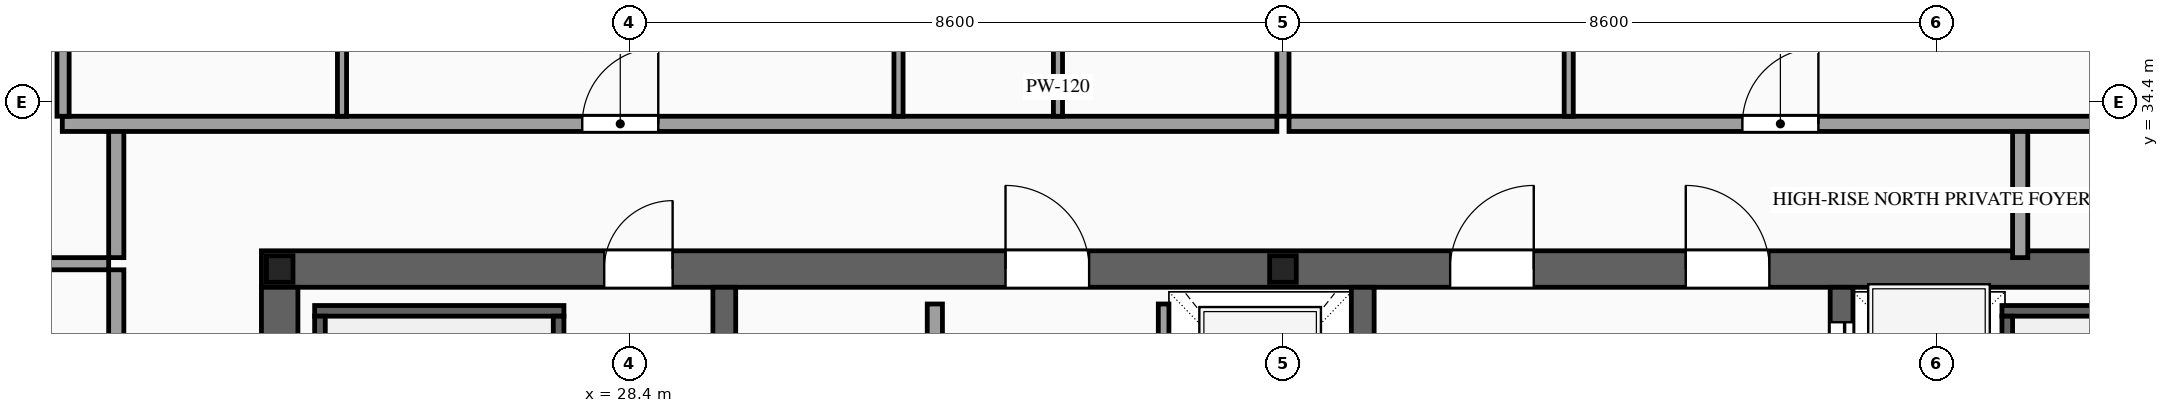
"""IFC4 building model, lengths in metres.
Left out: names, types, materials, properties, quantities, classifications, styles, units other than length and angle.
Written with IfcOpenShell. Run it as: python <this file> out.ifc"""

import sys

from ifc_helpers import new_model, si_unit, direction, frame, frame_2d, origin, origin_2d, place, context, subcontext, project, spatial, rectangle, i_section, extrude, source, transform, mapped, element, fill, save


model = new_model("IFC4")
c1 = context("Model", 3, precision=1e-05, world=origin(), true_north=direction((0.0, 1.0)))
c2 = subcontext(c1, "Body", "Model", "MODEL_VIEW")
j1 = project(units=[si_unit("LENGTHUNIT", "METRE"), si_unit("PLANEANGLEUNIT", "RADIAN")], contexts=[c1])
p1 = place(None, origin())
s1 = spatial("IfcSite", under=j1, at=p1, CompositionType="ELEMENT")
p2 = place(p1, origin())
s2 = spatial("IfcBuilding", under=s1, at=p2, CompositionType="ELEMENT")
p3 = place(p2, frame((0.0, 0.0, 314.7)))
s3 = spatial("IfcBuildingStorey", under=s2, at=p3, CompositionType="ELEMENT", Elevation=314.7)
p4 = place(p3, frame((23.56, 32.2, 0.0), z_axis=(0.0, 0.0, 1.0), x_axis=(1.0, 0.0, 0.0)))
e1 = element("IfcWall", 1, at=p4, inside=s3, PredefinedType="SHEAR", context=c2, shape_type="SweptSolid", body=[
    extrude(rectangle(XDim=26.88, YDim=0.48, at=frame_2d((13.44, 0.0))), origin(), (0.0, 0.0, 1.0), 3.5),
])
p5 = place(p4, frame((4.51, 0.0, 0.0)))
e2 = element("IfcOpeningElement", 2, at=p5, cuts=e1, PredefinedType="OPENING", context=c2, shape_type="SweptSolid", body=[
    extrude(rectangle(XDim=0.9, YDim=2.15, at=frame_2d((0.45, 1.075))), frame((0.0, 0.255, 0.0), z_axis=(0.0, -1.0, 0.0), x_axis=(1.0, 0.0, 0.0)), (0.0, 0.0, 1.0), 0.51),
])
p6 = place(p4, frame((9.79, 0.0, 0.0)))
e3 = element("IfcOpeningElement", 3, at=p6, cuts=e1, PredefinedType="OPENING", context=c2, shape_type="SweptSolid", body=[
    extrude(rectangle(XDim=1.1, YDim=2.2, at=frame_2d((0.55, 1.1))), frame((0.0, 0.255, 0.0), z_axis=(0.0, -1.0, 0.0), x_axis=(1.0, 0.0, 0.0)), (0.0, 0.0, 1.0), 0.51),
])
p7 = place(p4, frame((15.64, 0.0, 0.0)))
e4 = element("IfcOpeningElement", 4, at=p7, cuts=e1, PredefinedType="OPENING", context=c2, shape_type="SweptSolid", body=[
    extrude(rectangle(XDim=1.1, YDim=2.2, at=frame_2d((0.55, 1.1))), frame((0.0, 0.255, 0.0), z_axis=(0.0, -1.0, 0.0), x_axis=(1.0, 0.0, 0.0)), (0.0, 0.0, 1.0), 0.51),
])
p8 = place(p4, frame((18.74, 0.0, 0.0)))
e5 = element("IfcOpeningElement", 5, at=p8, cuts=e1, PredefinedType="OPENING", context=c2, shape_type="SweptSolid", body=[
    extrude(rectangle(XDim=1.1, YDim=2.2, at=frame_2d((0.55, 1.1))), frame((0.0, 0.255, 0.0), z_axis=(0.0, -1.0, 0.0), x_axis=(1.0, 0.0, 0.0)), (0.0, 0.0, 1.0), 0.51),
])
m1 = source(origin(), c2, "Body", "SweptSolid", [
    extrude(rectangle(XDim=12.32, YDim=0.48, at=frame_2d((6.16, 0.0))), origin(), (0.0, 0.0, 1.0), 3.5),
])
p9 = place(p3, frame((23.8, 19.64, 0.0), z_axis=(0.0, 0.0, 1.0), x_axis=(0.0, 1.0, 0.0)))
e6 = element("IfcWall", 6, at=p9, inside=s3, PredefinedType="SHEAR", context=c2, shape_type="MappedRepresentation", body=[
    mapped(m1, transform((0.0, 0.0, 0.0), scale=1.0)),
])
m2 = source(origin(), c2, "Body", "SweptSolid", [
    extrude(rectangle(XDim=12.32, YDim=0.3, at=frame_2d((6.16, 0.0))), origin(), (0.0, 0.0, 1.0), 3.5),
])
for number, where, z_axis, x_axis in (
    (7, (29.65, 19.64, 0.0), (0.0, 0.0, 1.0), (0.0, 1.0, 0.0)),
    (8, (38.05, 19.64, 0.0), (0.0, 0.0, 1.0), (0.0, 1.0, 0.0)),
):
    element("IfcWall", number, at=place(p3, frame(where, z_axis=z_axis, x_axis=x_axis)), inside=s3, PredefinedType="SOLIDWALL", context=c2, shape_type="MappedRepresentation", body=[
        mapped(m2, transform((0.0, 0.0, 0.0), scale=1.0)),
    ])
p10 = place(p3, frame((44.35, 19.64, 0.0), z_axis=(0.0, 0.0, 1.0), x_axis=(0.0, 1.0, 0.0)))
e9 = element("IfcWall", 9, at=p10, inside=s3, PredefinedType="SOLIDWALL", context=c2, shape_type="SweptSolid", body=[
    extrude(rectangle(XDim=12.32, YDim=0.3, at=frame_2d((6.16, 0.0))), origin(), (0.0, 0.0, 1.0), 3.5),
])
p11 = place(p10, frame((6.56, 0.0, 0.0)))
e10 = element("IfcOpeningElement", 10, at=p11, cuts=e9, PredefinedType="OPENING", context=c2, shape_type="SweptSolid", body=[
    extrude(rectangle(XDim=1.1, YDim=2.2, at=frame_2d((0.55, 1.1))), frame((0.0, 0.165, 0.0), z_axis=(0.0, -1.0, 0.0), x_axis=(1.0, 0.0, 0.0)), (0.0, 0.0, 1.0), 0.33),
])
p12 = place(p10, frame((8.66, 0.0, 0.0)))
e11 = element("IfcOpeningElement", 11, at=p12, cuts=e9, PredefinedType="OPENING", context=c2, shape_type="SweptSolid", body=[
    extrude(rectangle(XDim=1.1, YDim=2.2, at=frame_2d((0.55, 1.1))), frame((0.0, 0.165, 0.0), z_axis=(0.0, -1.0, 0.0), x_axis=(1.0, 0.0, 0.0)), (0.0, 0.0, 1.0), 0.33),
])
p13 = place(p10, frame((10.76, 0.0, 0.0)))
e12 = element("IfcOpeningElement", 12, at=p13, cuts=e9, PredefinedType="OPENING", context=c2, shape_type="SweptSolid", body=[
    extrude(rectangle(XDim=1.1, YDim=2.2, at=frame_2d((0.55, 1.1))), frame((0.0, 0.165, 0.0), z_axis=(0.0, -1.0, 0.0), x_axis=(1.0, 0.0, 0.0)), (0.0, 0.0, 1.0), 0.33),
])
m3 = source(origin(), c2, "Body", "SweptSolid", [
    extrude(i_section(OverallWidth=0.35, OverallDepth=0.35, WebThickness=0.012, FlangeThickness=0.019, at=origin_2d()), origin(), (0.0, 0.0, 1.0), 3.5),
])
for number, where, z_axis, x_axis in (
    (13, (23.8, 32.2, 0.0), (0.0, 0.0, 1.0), (1.0, 0.0, 0.0)),
    (14, (37.0, 32.2, 0.0), (0.0, 0.0, 1.0), (1.0, 0.0, 0.0)),
):
    element("IfcColumn", number, at=place(p3, frame(where, z_axis=z_axis, x_axis=x_axis)), inside=s3, PredefinedType="COLUMN", context=c2, shape_type="MappedRepresentation", body=[
        mapped(m3, transform((0.0, 0.0, 0.0), scale=1.0)),
    ])
p14 = place(p3, frame((35.43, 29.4, 0.0), z_axis=(0.0, 0.0, 1.0), x_axis=(0.0, 1.0, 0.0)))
e15 = element("IfcWall", 15, at=p14, inside=s3, PredefinedType="SOLIDWALL", context=c2, shape_type="SweptSolid", body=[
    extrude(rectangle(XDim=2.34, YDim=0.14, at=frame_2d((1.17, 0.0))), origin(), (0.0, 0.0, 1.0), 3.28),
])
p15 = place(p14, frame((0.62, 0.0, 0.0)))
e16 = element("IfcOpeningElement", 16, at=p15, cuts=e15, PredefinedType="OPENING", context=c2, shape_type="SweptSolid", body=[
    extrude(rectangle(XDim=1.1, YDim=2.2, at=frame_2d((0.55, 1.1))), frame((0.0, 0.085, 0.0), z_axis=(0.0, -1.0, 0.0), x_axis=(1.0, 0.0, 0.0)), (0.0, 0.0, 1.0), 0.17),
])
m4 = source(origin(), c2, "Body", "SweptSolid", [
    extrude(rectangle(XDim=3.28, YDim=0.14, at=frame_2d((1.64, 0.0))), origin(), (0.0, 0.0, 1.0), 3.28),
])
p16 = place(p3, frame((24.26, 31.65, 0.0), z_axis=(0.0, 0.0, 1.0), x_axis=(1.0, 0.0, 0.0)))
e17 = element("IfcWall", 17, at=p16, inside=s3, PredefinedType="SOLIDWALL", context=c2, shape_type="MappedRepresentation", body=[
    mapped(m4, transform((0.0, 0.0, 0.0), scale=1.0)),
])
m5 = source(origin(), c2, "Body", "SweptSolid", [
    extrude(rectangle(XDim=8.94, YDim=0.14, at=frame_2d((4.47, 0.0))), origin(), (0.0, 0.0, 1.0), 3.28),
])
for number, where, z_axis, x_axis in (
    (18, (24.33, 22.64, 0.0), (0.0, 0.0, 1.0), (0.0, 1.0, 0.0)),
    (19, (27.47, 22.64, 0.0), (0.0, 0.0, 1.0), (0.0, 1.0, 0.0)),
):
    element("IfcWall", number, at=place(p3, frame(where, z_axis=z_axis, x_axis=x_axis)), inside=s3, PredefinedType="SOLIDWALL", context=c2, shape_type="MappedRepresentation", body=[
        mapped(m5, transform((0.0, 0.0, 0.0), scale=1.0)),
    ])
p17 = place(p3, frame((46.46, 31.65, 0.0), z_axis=(0.0, 0.0, 1.0), x_axis=(1.0, 0.0, 0.0)))
e20 = element("IfcWall", 20, at=p17, inside=s3, PredefinedType="SOLIDWALL", context=c2, shape_type="MappedRepresentation", body=[
    mapped(m4, transform((0.0, 0.0, 0.0), scale=1.0)),
])
p18 = place(p3, frame((46.53, 22.64, 0.0), z_axis=(0.0, 0.0, 1.0), x_axis=(0.0, 1.0, 0.0)))
e21 = element("IfcWall", 21, at=p18, inside=s3, PredefinedType="SOLIDWALL", context=c2, shape_type="MappedRepresentation", body=[
    mapped(m5, transform((0.0, 0.0, 0.0), scale=1.0)),
])
p19 = place(p3, frame((32.42, 28.05, 0.0), z_axis=(0.0, 0.0, 1.0), x_axis=(0.0, 1.0, 0.0)))
e22 = element("IfcWall", 22, at=p19, inside=s3, PredefinedType="PARTITIONING", context=c2, shape_type="SweptSolid", body=[
    extrude(rectangle(XDim=3.69, YDim=0.2, at=frame_2d((1.845, 0.0))), origin(), (0.0, 0.0, 1.0), 3.28),
])
p20 = place(p19, frame((1.395, 0.0, 0.0)))
e23 = element("IfcOpeningElement", 23, at=p20, cuts=e22, PredefinedType="OPENING", context=c2, shape_type="SweptSolid", body=[
    extrude(rectangle(XDim=0.9, YDim=2.15, at=frame_2d((0.45, 1.075))), frame((0.0, 0.115, 0.0), z_axis=(0.0, -1.0, 0.0), x_axis=(1.0, 0.0, 0.0)), (0.0, 0.0, 1.0), 0.23),
])
m6 = source(origin(), c2, "Body", "SweptSolid", [
    extrude(rectangle(XDim=1.7, YDim=0.2, at=frame_2d((0.85, 0.0))), origin(), (0.0, 0.0, 1.0), 3.28),
])
for number, where, z_axis, x_axis in (
    (24, (21.65, 32.35, 0.0), (0.0, 0.0, 1.0), (0.0, 1.0, 0.0)),
    (25, (46.7, 32.35, 0.0), (0.0, 0.0, 1.0), (0.0, 1.0, 0.0)),
):
    element("IfcWall", number, at=place(p3, frame(where, z_axis=z_axis, x_axis=x_axis)), inside=s3, PredefinedType="PARTITIONING", context=c2, shape_type="MappedRepresentation", body=[
        mapped(m6, transform((0.0, 0.0, 0.0), scale=1.0)),
    ])
p21 = place(p3, frame((20.94, 34.11, 0.0), z_axis=(0.0, 0.0, 1.0), x_axis=(1.0, 0.0, 0.0)))
e26 = element("IfcWall", 26, at=p21, inside=s3, PredefinedType="PARTITIONING", context=c2, shape_type="SweptSolid", body=[
    extrude(rectangle(XDim=15.98, YDim=0.2, at=frame_2d((7.99, 0.0))), origin(), (0.0, 0.0, 1.0), 3.28),
])
p22 = place(p21, frame((6.841, 0.0, 0.0)))
e27 = element("IfcOpeningElement", 27, at=p22, cuts=e26, PredefinedType="OPENING", context=c2, shape_type="SweptSolid", body=[
    extrude(rectangle(XDim=1.0, YDim=2.2, at=frame_2d((0.5, 1.1))), frame((0.0, 0.115, 0.0), z_axis=(0.0, -1.0, 0.0), x_axis=(1.0, 0.0, 0.0)), (0.0, 0.0, 1.0), 0.23),
])
m7 = source(origin(), c2, "Body", "SweptSolid", [
    extrude(rectangle(XDim=10.54, YDim=0.16, at=frame_2d((5.27, 0.0))), origin(), (0.0, 0.0, 1.0), 2.787),
])
p23 = place(p3, frame((37.0, 34.21, 0.0), z_axis=(0.0, 0.0, 1.0), x_axis=(0.0, 1.0, 0.0)))
e28 = element("IfcWall", 28, at=p23, inside=s3, PredefinedType="PARTITIONING", context=c2, shape_type="MappedRepresentation", body=[
    mapped(m7, transform((0.0, 0.0, 0.0), scale=1.0)),
])
m8 = source(origin(), c2, "Body", "SweptSolid", [
    extrude(rectangle(XDim=2.9, YDim=0.12, at=frame_2d((1.45, 0.0))), origin(), (0.0, 0.0, 1.0), 3.28),
])
p24 = place(p3, frame((24.62, 34.21, 0.0), z_axis=(0.0, 0.0, 1.0), x_axis=(0.0, 1.0, 0.0)))
e29 = element("IfcWall", 29, at=p24, inside=s3, PredefinedType="PARTITIONING", context=c2, shape_type="MappedRepresentation", body=[
    mapped(m8, transform((0.0, 0.0, 0.0), scale=1.0)),
])
p25 = place(p3, frame((34.04, 34.21, 0.0), z_axis=(0.0, 0.0, 1.0), x_axis=(0.0, 1.0, 0.0)))
e30 = element("IfcWall", 30, at=p25, inside=s3, PredefinedType="PARTITIONING", context=c2, shape_type="SweptSolid", body=[
    extrude(rectangle(XDim=2.9, YDim=0.12, at=frame_2d((1.45, 0.0))), origin(), (0.0, 0.0, 1.0), 3.28),
])
p26 = place(p25, frame((1.025, 0.0, 0.0)))
e31 = element("IfcOpeningElement", 31, at=p26, cuts=e30, PredefinedType="OPENING", context=c2, shape_type="SweptSolid", body=[
    extrude(rectangle(XDim=0.85, YDim=2.1, at=frame_2d((0.425, 1.05))), frame((0.0, 0.075, 0.0), z_axis=(0.0, -1.0, 0.0), x_axis=(1.0, 0.0, 0.0)), (0.0, 0.0, 1.0), 0.15),
])
p27 = place(p3, frame((31.942, 34.21, 0.0), z_axis=(0.0, 0.0, 1.0), x_axis=(0.0, 1.0, 0.0)))
e32 = element("IfcWall", 32, at=p27, inside=s3, PredefinedType="PARTITIONING", context=c2, shape_type="SweptSolid", body=[
    extrude(rectangle(XDim=2.9, YDim=0.12, at=frame_2d((1.45, 0.0))), origin(), (0.0, 0.0, 1.0), 3.28),
])
p28 = place(p27, frame((1.025, 0.0, 0.0)))
e33 = element("IfcOpeningElement", 33, at=p28, cuts=e32, PredefinedType="OPENING", context=c2, shape_type="SweptSolid", body=[
    extrude(rectangle(XDim=0.85, YDim=2.1, at=frame_2d((0.425, 1.05))), frame((0.0, 0.075, 0.0), z_axis=(0.0, -1.0, 0.0), x_axis=(1.0, 0.0, 0.0)), (0.0, 0.0, 1.0), 0.15),
])
p29 = place(p3, frame((37.08, 34.11, 0.0), z_axis=(0.0, 0.0, 1.0), x_axis=(1.0, 0.0, 0.0)))
e34 = element("IfcWall", 34, at=p29, inside=s3, PredefinedType="PARTITIONING", context=c2, shape_type="SweptSolid", body=[
    extrude(rectangle(XDim=15.98, YDim=0.2, at=frame_2d((7.99, 0.0))), origin(), (0.0, 0.0, 1.0), 3.28),
])
p30 = place(p29, frame((5.965, 0.0, 0.0)))
e35 = element("IfcOpeningElement", 35, at=p30, cuts=e34, PredefinedType="OPENING", context=c2, shape_type="SweptSolid", body=[
    extrude(rectangle(XDim=1.0, YDim=2.2, at=frame_2d((0.5, 1.1))), frame((0.0, 0.115, 0.0), z_axis=(0.0, -1.0, 0.0), x_axis=(1.0, 0.0, 0.0)), (0.0, 0.0, 1.0), 0.23),
])
m9 = source(origin(), c2, "Body", "SweptSolid", [
    extrude(rectangle(XDim=10.39, YDim=0.16, at=frame_2d((5.195, 0.0))), origin(), (0.0, 0.0, 1.0), 3.28),
])
p31 = place(p3, frame((20.95, 34.21, 0.0), z_axis=(0.0, 0.0, 1.0), x_axis=(0.0, 1.0, 0.0)))
e36 = element("IfcWall", 36, at=p31, inside=s3, PredefinedType="PARTITIONING", context=c2, shape_type="MappedRepresentation", body=[
    mapped(m9, transform((0.0, 0.0, 0.0), scale=1.0)),
])
p32 = place(p3, frame((40.76, 34.21, 0.0), z_axis=(0.0, 0.0, 1.0), x_axis=(0.0, 1.0, 0.0)))
e37 = element("IfcWall", 37, at=p32, inside=s3, PredefinedType="PARTITIONING", context=c2, shape_type="MappedRepresentation", body=[
    mapped(m8, transform((0.0, 0.0, 0.0), scale=1.0)),
])
p33 = place(p3, frame((21.65, 19.41, 0.0), z_axis=(0.0, 0.0, 1.0), x_axis=(0.0, 1.0, 0.0)))
e38 = element("IfcWall", 38, at=p33, inside=s3, PredefinedType="PARTITIONING", context=c2, shape_type="SweptSolid", body=[
    extrude(rectangle(XDim=12.78, YDim=0.2, at=frame_2d((6.39, 0.0))), origin(), (0.0, 0.0, 1.0), 3.28),
])
p34 = place(p33, frame((5.89, 0.0, 0.0)))
e39 = element("IfcOpeningElement", 39, at=p34, cuts=e38, PredefinedType="OPENING", context=c2, shape_type="SweptSolid", body=[
    extrude(rectangle(XDim=1.0, YDim=2.2, at=frame_2d((0.5, 1.1))), frame((0.0, 0.115, 0.0), z_axis=(0.0, -1.0, 0.0), x_axis=(1.0, 0.0, 0.0)), (0.0, 0.0, 1.0), 0.23),
])
m10 = source(origin(), c2, "Body", "SweptSolid", [
    extrude(rectangle(XDim=3.5, YDim=0.16, at=frame_2d((1.75, 0.0))), origin(), (0.0, 0.0, 1.0), 2.825),
])
p35 = place(p3, frame((18.05, 32.27, 0.0), z_axis=(0.0, 0.0, 1.0), x_axis=(1.0, 0.0, 0.0)))
e40 = element("IfcWall", 40, at=p35, inside=s3, PredefinedType="PARTITIONING", context=c2, shape_type="MappedRepresentation", body=[
    mapped(m10, transform((0.0, 0.0, 0.0), scale=1.0)),
])
m11 = source(origin(), c2, "Body", "SweptSolid", [
    extrude(rectangle(XDim=1.1, YDim=2.2, at=frame_2d((0.55, 1.1))), frame((0.0, 0.025, 0.0), z_axis=(0.0, -1.0, 0.0), x_axis=(1.0, 0.0, 0.0)), (0.0, 0.0, 1.0), 0.05),
])
p36 = place(p13, origin())
e41 = element("IfcDoor", 41, at=p36, inside=s3, OperationType="SLIDING_TO_LEFT", PredefinedType="DOOR", context=c2, shape_type="MappedRepresentation", body=[
    mapped(m11, transform((0.0, 0.0, 0.0), scale=1.0)),
])
fill(e12, e41)
m12 = source(origin(), c2, "Body", "SweptSolid", [
    extrude(rectangle(XDim=0.9, YDim=2.15, at=frame_2d((0.45, 1.075))), frame((0.0, 0.025, 0.0), z_axis=(0.0, -1.0, 0.0), x_axis=(1.0, 0.0, 0.0)), (0.0, 0.0, 1.0), 0.05),
])
p37 = place(p5, origin())
e42 = element("IfcDoor", 42, at=p37, inside=s3, OperationType="SINGLE_SWING_RIGHT", PredefinedType="DOOR", context=c2, shape_type="MappedRepresentation", body=[
    mapped(m12, transform((0.0, 0.0, 0.0), scale=1.0)),
])
fill(e2, e42)
m13 = source(origin(), c2, "Body", "SweptSolid", [
    extrude(rectangle(XDim=1.1, YDim=2.2, at=frame_2d((0.55, 1.1))), frame((0.0, 0.025, 0.0), z_axis=(0.0, -1.0, 0.0), x_axis=(1.0, 0.0, 0.0)), (0.0, 0.0, 1.0), 0.05),
])
p38 = place(p6, origin())
e43 = element("IfcDoor", 43, at=p38, inside=s3, OperationType="SINGLE_SWING_LEFT", PredefinedType="DOOR", context=c2, shape_type="MappedRepresentation", body=[
    mapped(m13, transform((0.0, 0.0, 0.0), scale=1.0)),
])
fill(e3, e43)
p39 = place(p7, origin())
e44 = element("IfcDoor", 44, at=p39, inside=s3, OperationType="SINGLE_SWING_RIGHT", PredefinedType="DOOR", context=c2, shape_type="MappedRepresentation", body=[
    mapped(m13, transform((0.0, 0.0, 0.0), scale=1.0)),
])
fill(e4, e44)
p40 = place(p8, origin())
e45 = element("IfcDoor", 45, at=p40, inside=s3, OperationType="SINGLE_SWING_LEFT", PredefinedType="DOOR", context=c2, shape_type="MappedRepresentation", body=[
    mapped(m13, transform((0.0, 0.0, 0.0), scale=1.0)),
])
fill(e5, e45)
m14 = source(origin(), c2, "Body", "SweptSolid", [
    extrude(rectangle(XDim=1.0, YDim=2.2, at=frame_2d((0.5, 1.1))), frame((0.0, 0.025, 0.0), z_axis=(0.0, -1.0, 0.0), x_axis=(1.0, 0.0, 0.0)), (0.0, 0.0, 1.0), 0.05),
])
p41 = place(p22, origin())
e46 = element("IfcDoor", 46, at=p41, inside=s3, OperationType="SINGLE_SWING_RIGHT", PredefinedType="DOOR", context=c2, shape_type="MappedRepresentation", body=[
    mapped(m14, transform((0.0, 0.0, 0.0), scale=1.0)),
])
fill(e27, e46)
p42 = place(p30, origin())
e47 = element("IfcDoor", 47, at=p42, inside=s3, OperationType="SINGLE_SWING_RIGHT", PredefinedType="DOOR", context=c2, shape_type="MappedRepresentation", body=[
    mapped(m14, transform((0.0, 0.0, 0.0), scale=1.0)),
])
fill(e35, e47)
save(model, sys.argv[1])
